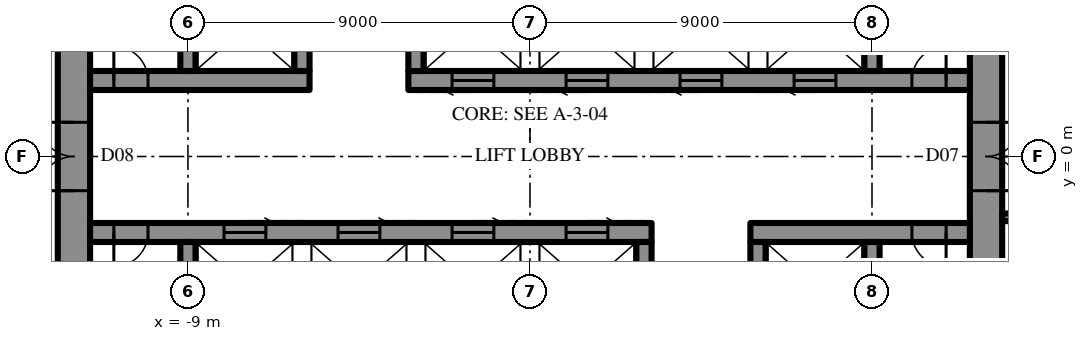
"""IFC4 building model, lengths in metres.
Left out: names, types, materials, properties, quantities, classifications, styles, units other than length and angle.
Written with IfcOpenShell. Run it as: python <this file> out.ifc"""

import sys

from ifc_helpers import new_model, si_unit, direction, frame, frame_2d, origin, place, context, subcontext, project, spatial, rectangle, extrude, element, fill, save


model = new_model("IFC4")
c1 = context("Model", 3, precision=1e-05, world=origin(), true_north=direction((0.0, 1.0)))
c2 = subcontext(c1, "Body", "Model", "MODEL_VIEW")
j1 = project(units=[si_unit("LENGTHUNIT", "METRE"), si_unit("PLANEANGLEUNIT", "RADIAN")], contexts=[c1])
p1 = place(None, origin())
s1 = spatial("IfcSite", under=j1, at=p1, CompositionType="ELEMENT")
p2 = place(p1, origin())
s2 = spatial("IfcBuilding", under=s1, at=p2, CompositionType="ELEMENT")
p3 = place(p2, frame((0.0, 0.0, 340.9)))
s3 = spatial("IfcBuildingStorey", under=s2, at=p3, CompositionType="ELEMENT", Elevation=340.9)
p4 = place(p3, frame((12.0, -10.7, 0.0), z_axis=(0.0, 0.0, 1.0), x_axis=(0.0, 1.0, 0.0)))
e1 = element("IfcWall", 1, at=p4, inside=s3, PredefinedType="SHEAR", context=c2, shape_type="SweptSolid", body=[
    extrude(rectangle(XDim=21.4, YDim=0.85, at=frame_2d((10.7, 0.0))), origin(), (0.0, 0.0, 1.0), 4.2),
])
p5 = place(p4, frame((9.8, 0.0, 0.0)))
e2 = element("IfcOpeningElement", 2, at=p5, cuts=e1, PredefinedType="OPENING", context=c2, shape_type="SweptSolid", body=[
    extrude(rectangle(XDim=1.8, YDim=2.4, at=frame_2d((0.9, 1.2))), frame((0.0, 0.435, 0.0), z_axis=(0.0, -1.0, 0.0), x_axis=(1.0, 0.0, 0.0)), (0.0, 0.0, 1.0), 0.87),
])
p6 = place(p3, frame((-12.0, 10.7, 0.0), z_axis=(0.0, 0.0, 1.0), x_axis=(0.0, -1.0, 0.0)))
e3 = element("IfcWall", 3, at=p6, inside=s3, PredefinedType="SHEAR", context=c2, shape_type="SweptSolid", body=[
    extrude(rectangle(XDim=21.4, YDim=0.85, at=frame_2d((10.7, 0.0))), origin(), (0.0, 0.0, 1.0), 4.2),
])
p7 = place(p6, frame((9.8, 0.0, 0.0)))
e4 = element("IfcOpeningElement", 4, at=p7, cuts=e3, PredefinedType="OPENING", context=c2, shape_type="SweptSolid", body=[
    extrude(rectangle(XDim=1.8, YDim=2.4, at=frame_2d((0.9, 1.2))), frame((0.0, 0.435, 0.0), z_axis=(0.0, -1.0, 0.0), x_axis=(1.0, 0.0, 0.0)), (0.0, 0.0, 1.0), 0.87),
])
p8 = place(p3, frame((-11.575, 2.0, 0.0), z_axis=(0.0, 0.0, 1.0), x_axis=(1.0, 0.0, 0.0)))
e5 = element("IfcWall", 5, at=p8, inside=s3, PredefinedType="SHEAR", context=c2, shape_type="SweptSolid", body=[
    extrude(rectangle(XDim=5.775, YDim=0.5, at=frame_2d((2.887, 0.0))), origin(), (0.0, 0.0, 1.0), 4.2),
])
p9 = place(p8, frame((0.625, 0.0, 0.0)))
e6 = element("IfcOpeningElement", 6, at=p9, cuts=e5, PredefinedType="OPENING", context=c2, shape_type="SweptSolid", body=[
    extrude(rectangle(XDim=0.9, YDim=2.2, at=frame_2d((0.45, 1.1))), frame((0.0, 0.26, 0.0), z_axis=(0.0, -1.0, 0.0), x_axis=(1.0, 0.0, 0.0)), (0.0, 0.0, 1.0), 0.52),
])
p10 = place(p3, frame((-3.2, 2.0, 0.0), z_axis=(0.0, 0.0, 1.0), x_axis=(1.0, 0.0, 0.0)))
e7 = element("IfcWall", 7, at=p10, inside=s3, PredefinedType="SHEAR", context=c2, shape_type="SweptSolid", body=[
    extrude(rectangle(XDim=14.775, YDim=0.5, at=frame_2d((7.387, 0.0))), origin(), (0.0, 0.0, 1.0), 4.2),
])
p11 = place(p10, frame((13.25, 0.0, 0.0)))
e8 = element("IfcOpeningElement", 8, at=p11, cuts=e7, PredefinedType="OPENING", context=c2, shape_type="SweptSolid", body=[
    extrude(rectangle(XDim=0.9, YDim=2.2, at=frame_2d((0.45, 1.1))), frame((0.0, 0.26, 0.0), z_axis=(0.0, -1.0, 0.0), x_axis=(1.0, 0.0, 0.0)), (0.0, 0.0, 1.0), 0.52),
])
p12 = place(p10, frame((1.15, 0.0, 0.0)))
e9 = element("IfcOpeningElement", 9, at=p12, cuts=e7, PredefinedType="OPENING", context=c2, shape_type="SweptSolid", body=[
    extrude(rectangle(XDim=1.1, YDim=2.2, at=frame_2d((0.55, 1.1))), frame((0.0, 0.26, 0.0), z_axis=(0.0, -1.0, 0.0), x_axis=(1.0, 0.0, 0.0)), (0.0, 0.0, 1.0), 0.52),
])
p13 = place(p10, frame((4.15, 0.0, 0.0)))
e10 = element("IfcOpeningElement", 10, at=p13, cuts=e7, PredefinedType="OPENING", context=c2, shape_type="SweptSolid", body=[
    extrude(rectangle(XDim=1.1, YDim=2.2, at=frame_2d((0.55, 1.1))), frame((0.0, 0.26, 0.0), z_axis=(0.0, -1.0, 0.0), x_axis=(1.0, 0.0, 0.0)), (0.0, 0.0, 1.0), 0.52),
])
p14 = place(p10, frame((7.15, 0.0, 0.0)))
e11 = element("IfcOpeningElement", 11, at=p14, cuts=e7, PredefinedType="OPENING", context=c2, shape_type="SweptSolid", body=[
    extrude(rectangle(XDim=1.1, YDim=2.2, at=frame_2d((0.55, 1.1))), frame((0.0, 0.26, 0.0), z_axis=(0.0, -1.0, 0.0), x_axis=(1.0, 0.0, 0.0)), (0.0, 0.0, 1.0), 0.52),
])
p15 = place(p10, frame((10.15, 0.0, 0.0)))
e12 = element("IfcOpeningElement", 12, at=p15, cuts=e7, PredefinedType="OPENING", context=c2, shape_type="SweptSolid", body=[
    extrude(rectangle(XDim=1.1, YDim=2.2, at=frame_2d((0.55, 1.1))), frame((0.0, 0.26, 0.0), z_axis=(0.0, -1.0, 0.0), x_axis=(1.0, 0.0, 0.0)), (0.0, 0.0, 1.0), 0.52),
])
for number, where, z_axis, x_axis in (
    (13, (-9.0, 2.25, 0.0), (0.0, 0.0, 1.0), (0.0, 1.0, 0.0)),
    (14, (-6.0, 2.25, 0.0), (0.0, 0.0, 1.0), (0.0, 1.0, 0.0)),
    (15, (-3.0, 2.25, 0.0), (0.0, 0.0, 1.0), (0.0, 1.0, 0.0)),
    (16, (9.0, 2.25, 0.0), (0.0, 0.0, 1.0), (0.0, 1.0, 0.0)),
):
    element("IfcWall", number, at=place(p3, frame(where, z_axis=z_axis, x_axis=x_axis)), inside=s3, PredefinedType="SHEAR", context=c2, shape_type="SweptSolid", body=[
        extrude(rectangle(XDim=2.3, YDim=0.4, at=frame_2d((1.15, 0.0))), origin(), (0.0, 0.0, 1.0), 4.2),
    ])
p16 = place(p3, frame((11.575, -2.0, 0.0), z_axis=(0.0, 0.0, 1.0), x_axis=(-1.0, 0.0, 0.0)))
e17 = element("IfcWall", 17, at=p16, inside=s3, PredefinedType="SHEAR", context=c2, shape_type="SweptSolid", body=[
    extrude(rectangle(XDim=5.775, YDim=0.5, at=frame_2d((2.887, 0.0))), origin(), (0.0, 0.0, 1.0), 4.2),
])
p17 = place(p16, frame((0.625, 0.0, 0.0)))
e18 = element("IfcOpeningElement", 18, at=p17, cuts=e17, PredefinedType="OPENING", context=c2, shape_type="SweptSolid", body=[
    extrude(rectangle(XDim=0.9, YDim=2.2, at=frame_2d((0.45, 1.1))), frame((0.0, 0.26, 0.0), z_axis=(0.0, -1.0, 0.0), x_axis=(1.0, 0.0, 0.0)), (0.0, 0.0, 1.0), 0.52),
])
p18 = place(p3, frame((3.2, -2.0, 0.0), z_axis=(0.0, 0.0, 1.0), x_axis=(-1.0, 0.0, 0.0)))
e19 = element("IfcWall", 19, at=p18, inside=s3, PredefinedType="SHEAR", context=c2, shape_type="SweptSolid", body=[
    extrude(rectangle(XDim=14.775, YDim=0.5, at=frame_2d((7.387, 0.0))), origin(), (0.0, 0.0, 1.0), 4.2),
])
p19 = place(p18, frame((13.25, 0.0, 0.0)))
e20 = element("IfcOpeningElement", 20, at=p19, cuts=e19, PredefinedType="OPENING", context=c2, shape_type="SweptSolid", body=[
    extrude(rectangle(XDim=0.9, YDim=2.2, at=frame_2d((0.45, 1.1))), frame((0.0, 0.26, 0.0), z_axis=(0.0, -1.0, 0.0), x_axis=(1.0, 0.0, 0.0)), (0.0, 0.0, 1.0), 0.52),
])
p20 = place(p18, frame((1.15, 0.0, 0.0)))
e21 = element("IfcOpeningElement", 21, at=p20, cuts=e19, PredefinedType="OPENING", context=c2, shape_type="SweptSolid", body=[
    extrude(rectangle(XDim=1.1, YDim=2.2, at=frame_2d((0.55, 1.1))), frame((0.0, 0.26, 0.0), z_axis=(0.0, -1.0, 0.0), x_axis=(1.0, 0.0, 0.0)), (0.0, 0.0, 1.0), 0.52),
])
p21 = place(p18, frame((4.15, 0.0, 0.0)))
e22 = element("IfcOpeningElement", 22, at=p21, cuts=e19, PredefinedType="OPENING", context=c2, shape_type="SweptSolid", body=[
    extrude(rectangle(XDim=1.1, YDim=2.2, at=frame_2d((0.55, 1.1))), frame((0.0, 0.26, 0.0), z_axis=(0.0, -1.0, 0.0), x_axis=(1.0, 0.0, 0.0)), (0.0, 0.0, 1.0), 0.52),
])
p22 = place(p18, frame((7.15, 0.0, 0.0)))
e23 = element("IfcOpeningElement", 23, at=p22, cuts=e19, PredefinedType="OPENING", context=c2, shape_type="SweptSolid", body=[
    extrude(rectangle(XDim=1.1, YDim=2.2, at=frame_2d((0.55, 1.1))), frame((0.0, 0.26, 0.0), z_axis=(0.0, -1.0, 0.0), x_axis=(1.0, 0.0, 0.0)), (0.0, 0.0, 1.0), 0.52),
])
p23 = place(p18, frame((10.15, 0.0, 0.0)))
e24 = element("IfcOpeningElement", 24, at=p23, cuts=e19, PredefinedType="OPENING", context=c2, shape_type="SweptSolid", body=[
    extrude(rectangle(XDim=1.1, YDim=2.2, at=frame_2d((0.55, 1.1))), frame((0.0, 0.26, 0.0), z_axis=(0.0, -1.0, 0.0), x_axis=(1.0, 0.0, 0.0)), (0.0, 0.0, 1.0), 0.52),
])
for number, where, z_axis, x_axis in (
    (25, (9.0, -2.25, 0.0), (0.0, 0.0, 1.0), (0.0, -1.0, 0.0)),
    (26, (6.0, -2.25, 0.0), (0.0, 0.0, 1.0), (0.0, -1.0, 0.0)),
    (27, (3.0, -2.25, 0.0), (0.0, 0.0, 1.0), (0.0, -1.0, 0.0)),
    (28, (-9.0, -2.25, 0.0), (0.0, 0.0, 1.0), (0.0, -1.0, 0.0)),
):
    element("IfcWall", number, at=place(p3, frame(where, z_axis=z_axis, x_axis=x_axis)), inside=s3, PredefinedType="SHEAR", context=c2, shape_type="SweptSolid", body=[
        extrude(rectangle(XDim=2.3, YDim=0.4, at=frame_2d((1.15, 0.0))), origin(), (0.0, 0.0, 1.0), 4.2),
    ])
p24 = place(p3, frame((12.425, -1.6, 0.0), z_axis=(0.0, 0.0, 1.0), x_axis=(1.0, 0.0, 0.0)))
e29 = element("IfcWall", 29, at=p24, inside=s3, PredefinedType="PARTITIONING", context=c2, shape_type="SweptSolid", body=[
    extrude(rectangle(XDim=16.5, YDim=0.2, at=frame_2d((8.25, 0.0))), origin(), (0.0, 0.0, 1.0), 4.0),
])
p25 = place(p24, frame((1.15, 0.0, 0.0)))
e30 = element("IfcOpeningElement", 30, at=p25, cuts=e29, PredefinedType="OPENING", context=c2, shape_type="SweptSolid", body=[
    extrude(rectangle(XDim=1.0, YDim=2.2, at=frame_2d((0.5, 1.1))), frame((0.0, 0.11, 0.0), z_axis=(0.0, -1.0, 0.0), x_axis=(1.0, 0.0, 0.0)), (0.0, 0.0, 1.0), 0.22),
])
p26 = place(p5, frame((1.8, 0.0, 0.0), z_axis=(0.0, 0.0, 1.0), x_axis=(-1.0, 0.0, 0.0)))
e31 = element("IfcDoor", 31, at=p26, inside=s3, OperationType="DOUBLE_DOOR_SINGLE_SWING", PredefinedType="DOOR", context=c2, shape_type="SweptSolid", body=[
    extrude(rectangle(XDim=1.8, YDim=2.4, at=frame_2d((0.9, 1.2))), frame((0.0, 0.025, 0.0), z_axis=(0.0, -1.0, 0.0), x_axis=(1.0, 0.0, 0.0)), (0.0, 0.0, 1.0), 0.05),
])
fill(e2, e31)
p27 = place(p7, frame((1.8, 0.0, 0.0), z_axis=(0.0, 0.0, 1.0), x_axis=(-1.0, 0.0, 0.0)))
e32 = element("IfcDoor", 32, at=p27, inside=s3, OperationType="DOUBLE_DOOR_SINGLE_SWING", PredefinedType="DOOR", context=c2, shape_type="SweptSolid", body=[
    extrude(rectangle(XDim=1.8, YDim=2.4, at=frame_2d((0.9, 1.2))), frame((0.0, 0.025, 0.0), z_axis=(0.0, -1.0, 0.0), x_axis=(1.0, 0.0, 0.0)), (0.0, 0.0, 1.0), 0.05),
])
fill(e4, e32)
p28 = place(p9, origin())
e33 = element("IfcDoor", 33, at=p28, inside=s3, OperationType="SINGLE_SWING_RIGHT", PredefinedType="DOOR", context=c2, shape_type="SweptSolid", body=[
    extrude(rectangle(XDim=0.9, YDim=2.2, at=frame_2d((0.45, 1.1))), frame((0.0, 0.025, 0.0), z_axis=(0.0, -1.0, 0.0), x_axis=(1.0, 0.0, 0.0)), (0.0, 0.0, 1.0), 0.05),
])
fill(e6, e33)
p29 = place(p11, origin())
e34 = element("IfcDoor", 34, at=p29, inside=s3, OperationType="SINGLE_SWING_LEFT", PredefinedType="DOOR", context=c2, shape_type="SweptSolid", body=[
    extrude(rectangle(XDim=0.9, YDim=2.2, at=frame_2d((0.45, 1.1))), frame((0.0, 0.025, 0.0), z_axis=(0.0, -1.0, 0.0), x_axis=(1.0, 0.0, 0.0)), (0.0, 0.0, 1.0), 0.05),
])
fill(e8, e34)
p30 = place(p17, origin())
e35 = element("IfcDoor", 35, at=p30, inside=s3, OperationType="SINGLE_SWING_RIGHT", PredefinedType="DOOR", context=c2, shape_type="SweptSolid", body=[
    extrude(rectangle(XDim=0.9, YDim=2.2, at=frame_2d((0.45, 1.1))), frame((0.0, 0.025, 0.0), z_axis=(0.0, -1.0, 0.0), x_axis=(1.0, 0.0, 0.0)), (0.0, 0.0, 1.0), 0.05),
])
fill(e18, e35)
p31 = place(p19, origin())
e36 = element("IfcDoor", 36, at=p31, inside=s3, OperationType="SINGLE_SWING_LEFT", PredefinedType="DOOR", context=c2, shape_type="SweptSolid", body=[
    extrude(rectangle(XDim=0.9, YDim=2.2, at=frame_2d((0.45, 1.1))), frame((0.0, 0.025, 0.0), z_axis=(0.0, -1.0, 0.0), x_axis=(1.0, 0.0, 0.0)), (0.0, 0.0, 1.0), 0.05),
])
fill(e20, e36)
p32 = place(p12, frame((1.1, 0.0, 0.0), z_axis=(0.0, 0.0, 1.0), x_axis=(-1.0, 0.0, 0.0)))
e37 = element("IfcDoor", 37, at=p32, inside=s3, OperationType="SLIDING_TO_LEFT", PredefinedType="DOOR", context=c2, shape_type="SweptSolid", body=[
    extrude(rectangle(XDim=1.1, YDim=2.2, at=frame_2d((0.55, 1.1))), frame((0.0, 0.025, 0.0), z_axis=(0.0, -1.0, 0.0), x_axis=(1.0, 0.0, 0.0)), (0.0, 0.0, 1.0), 0.05),
])
fill(e9, e37)
p33 = place(p13, frame((1.1, 0.0, 0.0), z_axis=(0.0, 0.0, 1.0), x_axis=(-1.0, 0.0, 0.0)))
e38 = element("IfcDoor", 38, at=p33, inside=s3, OperationType="SLIDING_TO_LEFT", PredefinedType="DOOR", context=c2, shape_type="SweptSolid", body=[
    extrude(rectangle(XDim=1.1, YDim=2.2, at=frame_2d((0.55, 1.1))), frame((0.0, 0.025, 0.0), z_axis=(0.0, -1.0, 0.0), x_axis=(1.0, 0.0, 0.0)), (0.0, 0.0, 1.0), 0.05),
])
fill(e10, e38)
p34 = place(p14, frame((1.1, 0.0, 0.0), z_axis=(0.0, 0.0, 1.0), x_axis=(-1.0, 0.0, 0.0)))
e39 = element("IfcDoor", 39, at=p34, inside=s3, OperationType="SLIDING_TO_LEFT", PredefinedType="DOOR", context=c2, shape_type="SweptSolid", body=[
    extrude(rectangle(XDim=1.1, YDim=2.2, at=frame_2d((0.55, 1.1))), frame((0.0, 0.025, 0.0), z_axis=(0.0, -1.0, 0.0), x_axis=(1.0, 0.0, 0.0)), (0.0, 0.0, 1.0), 0.05),
])
fill(e11, e39)
p35 = place(p15, frame((1.1, 0.0, 0.0), z_axis=(0.0, 0.0, 1.0), x_axis=(-1.0, 0.0, 0.0)))
e40 = element("IfcDoor", 40, at=p35, inside=s3, OperationType="SLIDING_TO_LEFT", PredefinedType="DOOR", context=c2, shape_type="SweptSolid", body=[
    extrude(rectangle(XDim=1.1, YDim=2.2, at=frame_2d((0.55, 1.1))), frame((0.0, 0.025, 0.0), z_axis=(0.0, -1.0, 0.0), x_axis=(1.0, 0.0, 0.0)), (0.0, 0.0, 1.0), 0.05),
])
fill(e12, e40)
p36 = place(p20, frame((1.1, 0.0, 0.0), z_axis=(0.0, 0.0, 1.0), x_axis=(-1.0, 0.0, 0.0)))
e41 = element("IfcDoor", 41, at=p36, inside=s3, OperationType="SLIDING_TO_LEFT", PredefinedType="DOOR", context=c2, shape_type="SweptSolid", body=[
    extrude(rectangle(XDim=1.1, YDim=2.2, at=frame_2d((0.55, 1.1))), frame((0.0, 0.025, 0.0), z_axis=(0.0, -1.0, 0.0), x_axis=(1.0, 0.0, 0.0)), (0.0, 0.0, 1.0), 0.05),
])
fill(e21, e41)
p37 = place(p21, frame((1.1, 0.0, 0.0), z_axis=(0.0, 0.0, 1.0), x_axis=(-1.0, 0.0, 0.0)))
e42 = element("IfcDoor", 42, at=p37, inside=s3, OperationType="SLIDING_TO_LEFT", PredefinedType="DOOR", context=c2, shape_type="SweptSolid", body=[
    extrude(rectangle(XDim=1.1, YDim=2.2, at=frame_2d((0.55, 1.1))), frame((0.0, 0.025, 0.0), z_axis=(0.0, -1.0, 0.0), x_axis=(1.0, 0.0, 0.0)), (0.0, 0.0, 1.0), 0.05),
])
fill(e22, e42)
p38 = place(p22, frame((1.1, 0.0, 0.0), z_axis=(0.0, 0.0, 1.0), x_axis=(-1.0, 0.0, 0.0)))
e43 = element("IfcDoor", 43, at=p38, inside=s3, OperationType="SLIDING_TO_LEFT", PredefinedType="DOOR", context=c2, shape_type="SweptSolid", body=[
    extrude(rectangle(XDim=1.1, YDim=2.2, at=frame_2d((0.55, 1.1))), frame((0.0, 0.025, 0.0), z_axis=(0.0, -1.0, 0.0), x_axis=(1.0, 0.0, 0.0)), (0.0, 0.0, 1.0), 0.05),
])
fill(e23, e43)
p39 = place(p23, frame((1.1, 0.0, 0.0), z_axis=(0.0, 0.0, 1.0), x_axis=(-1.0, 0.0, 0.0)))
e44 = element("IfcDoor", 44, at=p39, inside=s3, OperationType="SLIDING_TO_LEFT", PredefinedType="DOOR", context=c2, shape_type="SweptSolid", body=[
    extrude(rectangle(XDim=1.1, YDim=2.2, at=frame_2d((0.55, 1.1))), frame((0.0, 0.025, 0.0), z_axis=(0.0, -1.0, 0.0), x_axis=(1.0, 0.0, 0.0)), (0.0, 0.0, 1.0), 0.05),
])
fill(e24, e44)
save(model, sys.argv[1])
